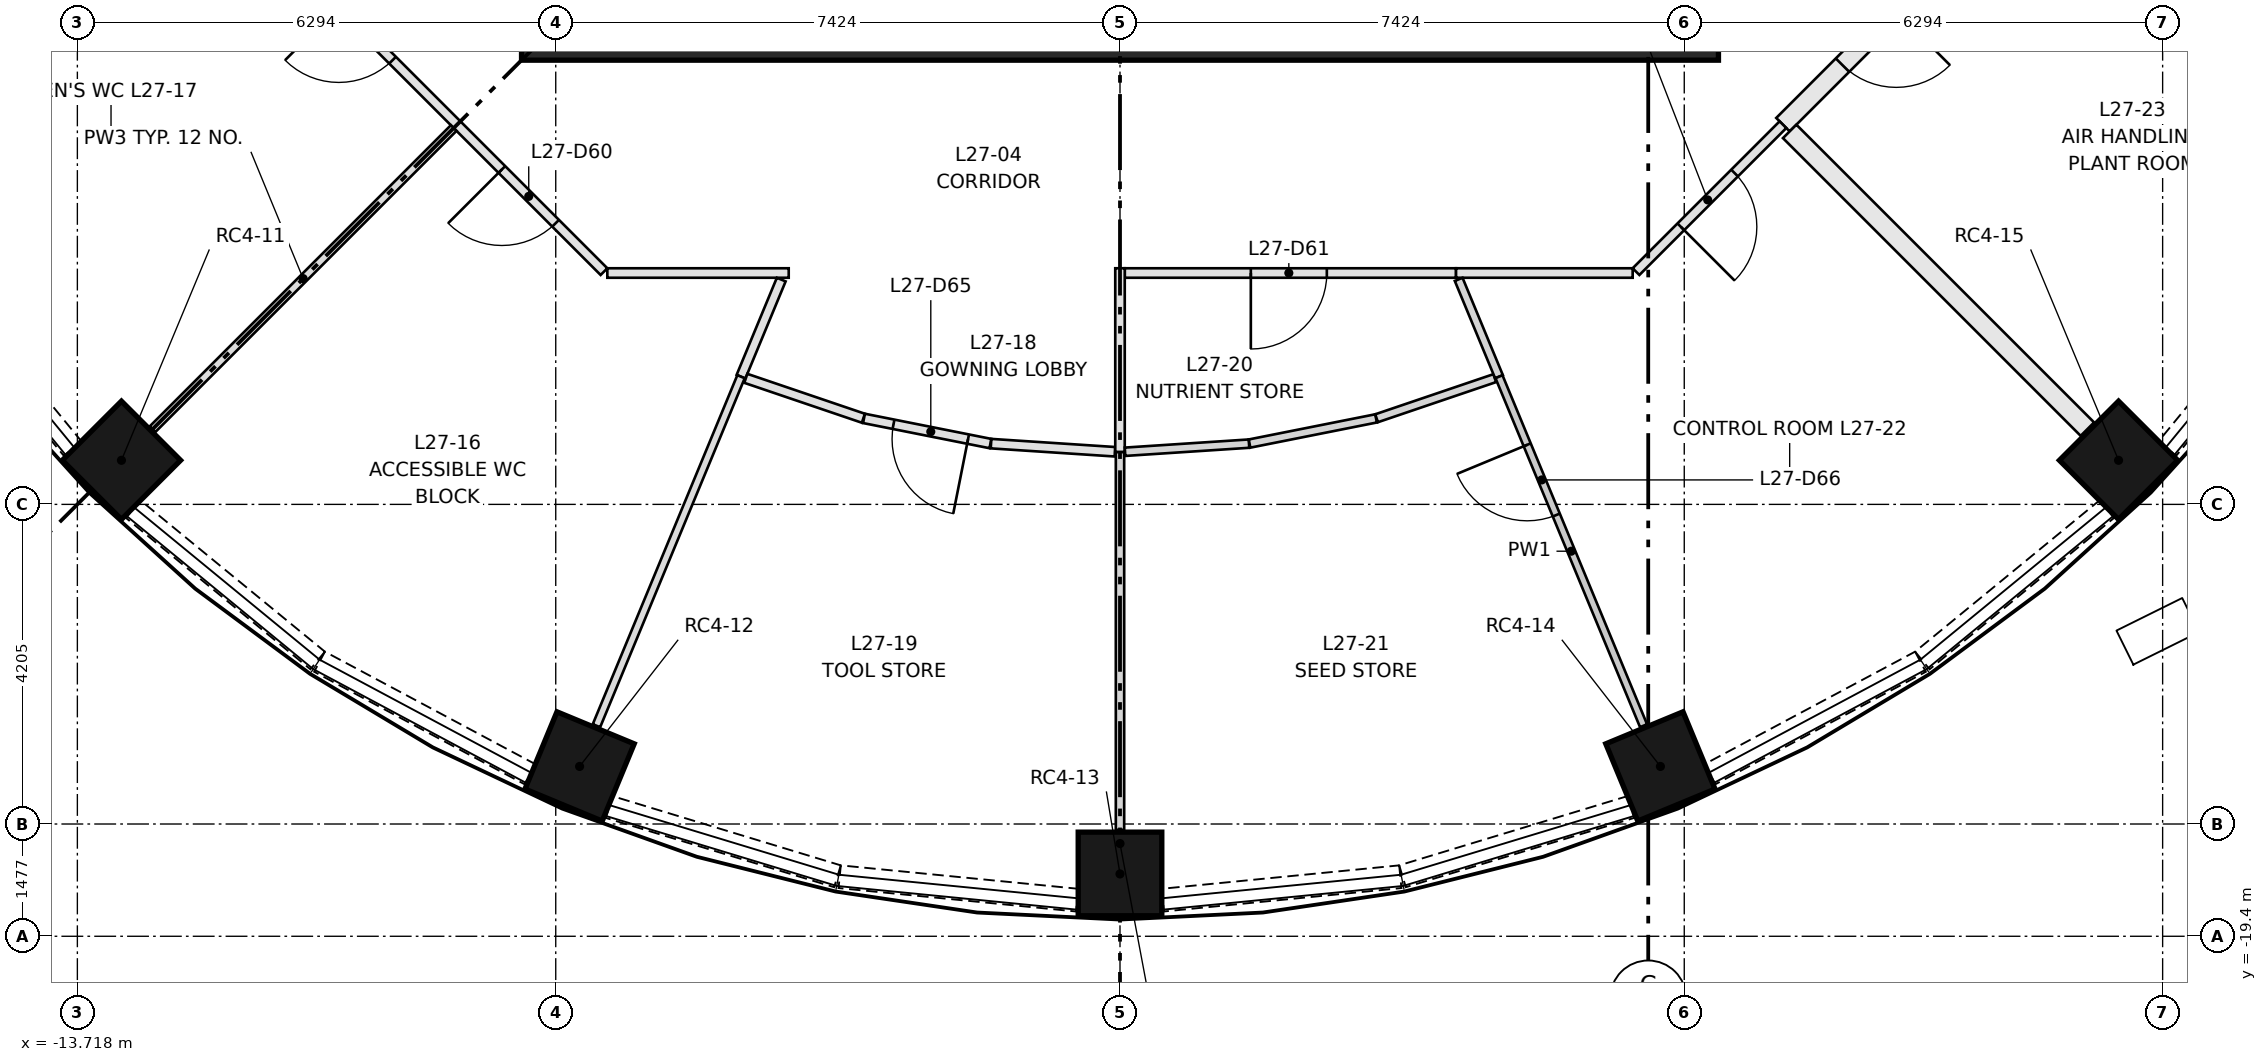
"""IFC4 building model, lengths in metres.
Left out: names, types, materials, properties, quantities, classifications, styles, units other than length and angle.
Written with IfcOpenShell. Run it as: python <this file> out.ifc"""

import sys

from ifc_helpers import new_model, si_unit, direction, frame, frame_2d, origin, origin_2d, place, context, subcontext, project, spatial, rectangle, extrude, element, fill, save


model = new_model("IFC4")
c1 = context("Model", 3, precision=1e-05, world=origin(), true_north=direction((0.0, 1.0)))
c2 = subcontext(c1, "Body", "Model", "MODEL_VIEW")
j1 = project(units=[si_unit("LENGTHUNIT", "METRE"), si_unit("PLANEANGLEUNIT", "RADIAN")], contexts=[c1])
p1 = place(None, origin())
s1 = spatial("IfcSite", under=j1, at=p1, CompositionType="ELEMENT")
p2 = place(p1, origin())
s2 = spatial("IfcBuilding", under=s1, at=p2, CompositionType="ELEMENT")
p3 = place(p2, frame((0.0, 0.0, 105.6)))
s3 = spatial("IfcBuildingStorey", under=s2, at=p3, CompositionType="ELEMENT", Elevation=105.6)
for number, where, z_axis, x_axis in (
    (1, (-13.138, -13.138, 0.0), (0.0, 0.0, 1.0), (-0.707, -0.707, 0.0)),
    (2, (-7.11, -17.166, 0.0), (0.0, 0.0, 1.0), (-0.383, -0.924, 0.0)),
    (3, (0.0, -18.58, 0.0), (0.0, 0.0, 1.0), (0.0, -1.0, 0.0)),
    (4, (7.11, -17.166, 0.0), (0.0, 0.0, 1.0), (0.383, -0.924, 0.0)),
    (5, (13.138, -13.138, 0.0), (0.0, 0.0, 1.0), (0.707, -0.707, 0.0)),
):
    element("IfcColumn", number, at=place(p3, frame(where, z_axis=z_axis, x_axis=x_axis)), inside=s3, PredefinedType="COLUMN", context=c2, shape_type="SweptSolid", body=[
        extrude(rectangle(XDim=1.1, YDim=1.1, at=origin_2d()), origin(), (0.0, 0.0, 1.0), 3.65),
    ])
p4 = place(p3, frame((-7.874, -7.499, 0.0), z_axis=(0.0, 0.0, 1.0), x_axis=(1.0, 0.0, 0.0)))
e6 = element("IfcWall", 6, at=p4, inside=s3, PredefinedType="SHEAR", context=c2, shape_type="SweptSolid", body=[
    extrude(rectangle(XDim=15.748, YDim=0.75, at=frame_2d((7.874, 0.0))), origin(), (0.0, 0.0, 1.0), 3.65),
])
for number, where, z_axis, x_axis in (
    (7, (-15.771, -10.557, 0.0), (0.0, 0.0, 1.0), (0.634, -0.773, 0.0)),
    (8, (-12.983, -13.781, 0.0), (0.0, 0.0, 1.0), (0.773, -0.634, 0.0)),
):
    element("IfcWall", number, at=place(p3, frame(where, z_axis=z_axis, x_axis=x_axis)), inside=s3, PredefinedType="SOLIDWALL", context=c2, shape_type="SweptSolid", body=[
        extrude(rectangle(XDim=3.139, YDim=0.3, at=frame_2d((1.569, 0.0))), origin(), (0.0, 0.0, 1.0), 0.9),
    ])
p5 = place(p3, frame((-10.532, -15.788, 0.0), z_axis=(0.0, 0.0, 1.0), x_axis=(0.88193278355, -0.471375185282, 0.0)))
e9 = element("IfcWall", 9, at=p5, inside=s3, PredefinedType="SOLIDWALL", context=c2, shape_type="SweptSolid", body=[
    extrude(rectangle(XDim=3.139, YDim=0.3, at=frame_2d((1.57, 0.0))), origin(), (0.0, 0.0, 1.0), 0.9),
])
p6 = place(p3, frame((-6.722, -17.699, 0.0), z_axis=(0.0, 0.0, 1.0), x_axis=(0.956961595403, -0.290214584271, 0.0)))
e10 = element("IfcWall", 10, at=p6, inside=s3, PredefinedType="SOLIDWALL", context=c2, shape_type="SweptSolid", body=[
    extrude(rectangle(XDim=3.139, YDim=0.3, at=frame_2d((1.57, 0.0))), origin(), (0.0, 0.0, 1.0), 0.9),
])
for number, where, z_axis, x_axis in (
    (11, (-3.688, -18.616, 0.0), (0.0, 0.0, 1.0), (0.995, -0.098, 0.0)),
    (12, (0.564, -18.925, 0.0), (0.0, 0.0, 1.0), (0.995, 0.098, 0.0)),
):
    element("IfcWall", number, at=place(p3, frame(where, z_axis=z_axis, x_axis=x_axis)), inside=s3, PredefinedType="SOLIDWALL", context=c2, shape_type="SweptSolid", body=[
        extrude(rectangle(XDim=3.139, YDim=0.3, at=frame_2d((1.57, 0.0))), origin(), (0.0, 0.0, 1.0), 0.9),
    ])
p7 = place(p3, frame((3.717, -18.611, 0.0), z_axis=(0.0, 0.0, 1.0), x_axis=(0.956961595403, 0.290214584271, 0.0)))
e13 = element("IfcWall", 13, at=p7, inside=s3, PredefinedType="SOLIDWALL", context=c2, shape_type="SweptSolid", body=[
    extrude(rectangle(XDim=3.139, YDim=0.3, at=frame_2d((1.57, 0.0))), origin(), (0.0, 0.0, 1.0), 0.9),
])
p8 = place(p3, frame((7.763, -17.268, 0.0), z_axis=(0.0, 0.0, 1.0), x_axis=(0.88193278355, 0.471375185282, 0.0)))
e14 = element("IfcWall", 14, at=p8, inside=s3, PredefinedType="SOLIDWALL", context=c2, shape_type="SweptSolid", body=[
    extrude(rectangle(XDim=3.139, YDim=0.3, at=frame_2d((1.57, 0.0))), origin(), (0.0, 0.0, 1.0), 0.9),
])
for number, where, z_axis, x_axis in (
    (15, (10.557, -15.771, 0.0), (0.0, 0.0, 1.0), (0.773, 0.634, 0.0)),
    (16, (13.781, -12.983, 0.0), (0.0, 0.0, 1.0), (0.634, 0.773, 0.0)),
):
    element("IfcWall", number, at=place(p3, frame(where, z_axis=z_axis, x_axis=x_axis)), inside=s3, PredefinedType="SOLIDWALL", context=c2, shape_type="SweptSolid", body=[
        extrude(rectangle(XDim=3.139, YDim=0.3, at=frame_2d((1.569, 0.0))), origin(), (0.0, 0.0, 1.0), 0.9),
    ])
p9 = place(p3, frame((10.637, -6.808, 0.0), z_axis=(0.0, 0.0, 1.0), x_axis=(-0.707151855722, -0.707061703777, 0.0)))
e17 = element("IfcWall", 17, at=p9, inside=s3, PredefinedType="PARTITIONING", context=c2, shape_type="SweptSolid", body=[
    extrude(rectangle(XDim=2.708, YDim=0.25, at=frame_2d((1.354, 0.0))), origin(), (0.0, 0.0, 1.0), 3.3),
])
p10 = place(p9, frame((0.6, 0.0, 0.0)))
e18 = element("IfcOpeningElement", 18, at=p10, cuts=e17, PredefinedType="OPENING", context=c2, shape_type="SweptSolid", body=[
    extrude(rectangle(XDim=1.0, YDim=2.1, at=frame_2d((0.5, 1.05))), frame((0.0, 0.135, 0.0), z_axis=(0.0, -1.0, 0.0), x_axis=(1.0, 0.0, 0.0)), (0.0, 0.0, 1.0), 0.27),
])
p11 = place(p3, frame((-8.722, -8.722, 0.0), z_axis=(0.0, 0.0, 1.0), x_axis=(-0.707151428813, 0.707062130741, 0.0)))
e19 = element("IfcWall", 19, at=p11, inside=s3, PredefinedType="PARTITIONING", context=c2, shape_type="SweptSolid", body=[
    extrude(rectangle(XDim=2.734, YDim=0.125, at=frame_2d((1.367, 0.0))), origin(), (0.0, 0.0, 1.0), 3.3),
])
p12 = place(p11, frame((1.2, 0.0, 0.0)))
e20 = element("IfcOpeningElement", 20, at=p12, cuts=e19, PredefinedType="OPENING", context=c2, shape_type="SweptSolid", body=[
    extrude(rectangle(XDim=1.0, YDim=2.1, at=frame_2d((0.5, 1.05))), frame((0.0, 0.073, 0.0), z_axis=(0.0, -1.0, 0.0), x_axis=(1.0, 0.0, 0.0)), (0.0, 0.0, 1.0), 0.145),
])
p13 = place(p3, frame((-6.789, -10.656, 0.0), z_axis=(0.0, 0.0, 1.0), x_axis=(-0.707062130741, 0.707151428813, 0.0)))
e21 = element("IfcWall", 21, at=p13, inside=s3, PredefinedType="PARTITIONING", context=c2, shape_type="SweptSolid", body=[
    extrude(rectangle(XDim=2.734, YDim=0.125, at=frame_2d((1.367, 0.0))), origin(), (0.0, 0.0, 1.0), 3.3),
])
p14 = place(p13, frame((0.9, 0.0, 0.0)))
e22 = element("IfcOpeningElement", 22, at=p14, cuts=e21, PredefinedType="OPENING", context=c2, shape_type="SweptSolid", body=[
    extrude(rectangle(XDim=1.0, YDim=2.1, at=frame_2d((0.5, 1.05))), frame((0.0, 0.073, 0.0), z_axis=(0.0, -1.0, 0.0), x_axis=(1.0, 0.0, 0.0)), (0.0, 0.0, 1.0), 0.145),
])
p15 = place(p3, frame((-4.359, -10.674, 0.0), z_axis=(0.0, 0.0, 1.0), x_axis=(-1.0, 0.0, 0.0)))
e23 = element("IfcWall", 23, at=p15, inside=s3, PredefinedType="PARTITIONING", context=c2, shape_type="SweptSolid", body=[
    extrude(rectangle(XDim=2.386, YDim=0.125, at=frame_2d((1.193, 0.0))), origin(), (0.0, 0.0, 1.0), 3.3),
])
p16 = place(p3, frame((4.421, -10.674, 0.0), z_axis=(0.0, 0.0, 1.0), x_axis=(-1.0, 0.0, 0.0)))
e24 = element("IfcWall", 24, at=p16, inside=s3, PredefinedType="PARTITIONING", context=c2, shape_type="SweptSolid", body=[
    extrude(rectangle(XDim=4.359, YDim=0.125, at=frame_2d((2.179, 0.0))), origin(), (0.0, 0.0, 1.0), 3.3),
])
p17 = place(p16, frame((1.7, 0.0, 0.0)))
e25 = element("IfcOpeningElement", 25, at=p17, cuts=e24, PredefinedType="OPENING", context=c2, shape_type="SweptSolid", body=[
    extrude(rectangle(XDim=1.0, YDim=2.1, at=frame_2d((0.5, 1.05))), frame((0.0, 0.073, 0.0), z_axis=(0.0, -1.0, 0.0), x_axis=(1.0, 0.0, 0.0)), (0.0, 0.0, 1.0), 0.145),
])
p18 = place(p3, frame((6.745, -10.674, 0.0), z_axis=(0.0, 0.0, 1.0), x_axis=(-1.0, 0.0, 0.0)))
e26 = element("IfcWall", 26, at=p18, inside=s3, PredefinedType="PARTITIONING", context=c2, shape_type="SweptSolid", body=[
    extrude(rectangle(XDim=2.324, YDim=0.125, at=frame_2d((1.162, 0.0))), origin(), (0.0, 0.0, 1.0), 3.3),
])
p19 = place(p3, frame((8.722, -8.722, 0.0), z_axis=(0.0, 0.0, 1.0), x_axis=(-0.707062130741, -0.707151428813, 0.0)))
e27 = element("IfcWall", 27, at=p19, inside=s3, PredefinedType="PARTITIONING", context=c2, shape_type="SweptSolid", body=[
    extrude(rectangle(XDim=2.734, YDim=0.125, at=frame_2d((1.367, 0.0))), origin(), (0.0, 0.0, 1.0), 3.3),
])
p20 = place(p19, frame((0.9, 0.0, 0.0)))
e28 = element("IfcOpeningElement", 28, at=p20, cuts=e27, PredefinedType="OPENING", context=c2, shape_type="SweptSolid", body=[
    extrude(rectangle(XDim=1.0, YDim=2.1, at=frame_2d((0.5, 1.05))), frame((0.0, 0.073, 0.0), z_axis=(0.0, -1.0, 0.0), x_axis=(1.0, 0.0, 0.0)), (0.0, 0.0, 1.0), 0.145),
])
p21 = place(p3, frame((-12.728, -12.728, 0.0), z_axis=(0.0, 0.0, 1.0), x_axis=(0.707106781187, 0.707106781187, 0.0)))
e29 = element("IfcWall", 29, at=p21, inside=s3, PredefinedType="PARTITIONING", context=c2, shape_type="SweptSolid", body=[
    extrude(rectangle(XDim=5.602, YDim=0.105, at=frame_2d((2.801, 0.0))), origin(), (0.0, 0.0, 1.0), 3.3),
])
p22 = place(p3, frame((-4.457, -10.76, 0.0), z_axis=(0.0, 0.0, 1.0), x_axis=(-0.382746785562, -0.923853288213, 0.0)))
e30 = element("IfcWall", 30, at=p22, inside=s3, PredefinedType="PARTITIONING", context=c2, shape_type="SweptSolid", body=[
    extrude(rectangle(XDim=1.383, YDim=0.125, at=frame_2d((0.691, 0.0))), origin(), (0.0, 0.0, 1.0), 3.3),
])
p23 = place(p3, frame((-4.986, -12.038, 0.0), z_axis=(0.0, 0.0, 1.0), x_axis=(-0.38266126553, -0.923888714003, 0.0)))
e31 = element("IfcWall", 31, at=p23, inside=s3, PredefinedType="PARTITIONING", context=c2, shape_type="SweptSolid", body=[
    extrude(rectangle(XDim=4.97, YDim=0.105, at=frame_2d((2.485, 0.0))), origin(), (0.0, 0.0, 1.0), 3.3),
])
p24 = place(p3, frame((-3.376, -12.585, 0.0), z_axis=(0.0, 0.0, 1.0), x_axis=(-0.946920220616, 0.321468654442, 0.0)))
e32 = element("IfcWall", 32, at=p24, inside=s3, PredefinedType="PARTITIONING", context=c2, shape_type="SweptSolid", body=[
    extrude(rectangle(XDim=1.634, YDim=0.125, at=frame_2d((0.817, 0.0))), origin(), (0.0, 0.0, 1.0), 3.3),
])
p25 = place(p3, frame((-1.705, -12.918, 0.0), z_axis=(0.0, 0.0, 1.0), x_axis=(-0.980795988991, 0.195036478586, 0.0)))
e33 = element("IfcWall", 33, at=p25, inside=s3, PredefinedType="PARTITIONING", context=c2, shape_type="SweptSolid", body=[
    extrude(rectangle(XDim=1.696, YDim=0.125, at=frame_2d((0.848, 0.0))), origin(), (0.0, 0.0, 1.0), 3.3),
])
p26 = place(p25, frame((0.3, 0.0, 0.0)))
e34 = element("IfcOpeningElement", 34, at=p26, cuts=e33, PredefinedType="OPENING", context=c2, shape_type="SweptSolid", body=[
    extrude(rectangle(XDim=1.0, YDim=2.1, at=frame_2d((0.5, 1.05))), frame((0.0, 0.073, 0.0), z_axis=(0.0, -1.0, 0.0), x_axis=(1.0, 0.0, 0.0)), (0.0, 0.0, 1.0), 0.145),
])
p27 = place(p3, frame((-0.067, -13.026, 0.0), z_axis=(0.0, 0.0, 1.0), x_axis=(-0.997855349109, 0.065457637099, 0.0)))
e35 = element("IfcWall", 35, at=p27, inside=s3, PredefinedType="PARTITIONING", context=c2, shape_type="SweptSolid", body=[
    extrude(rectangle(XDim=1.634, YDim=0.125, at=frame_2d((0.817, 0.0))), origin(), (0.0, 0.0, 1.0), 3.3),
])
p28 = place(p3, frame((0.0, -10.612, 0.0), z_axis=(0.0, 0.0, 1.0), x_axis=(0.0, -1.0, 0.0)))
e36 = element("IfcWall", 36, at=p28, inside=s3, PredefinedType="PARTITIONING", context=c2, shape_type="SweptSolid", body=[
    extrude(rectangle(XDim=2.418, YDim=0.125, at=frame_2d((1.209, 0.0))), origin(), (0.0, 0.0, 1.0), 3.3),
])
p29 = place(p3, frame((0.0, -13.03, 0.0), z_axis=(0.0, 0.0, 1.0), x_axis=(0.0, -1.0, 0.0)))
e37 = element("IfcWall", 37, at=p29, inside=s3, PredefinedType="PARTITIONING", context=c2, shape_type="SweptSolid", body=[
    extrude(rectangle(XDim=4.97, YDim=0.11, at=frame_2d((2.485, 0.0))), origin(), (0.0, 0.0, 1.0), 3.3),
])
p30 = place(p3, frame((1.697, -12.919, 0.0), z_axis=(0.0, 0.0, 1.0), x_axis=(-0.997857908157, -0.065418614545, 0.0)))
e38 = element("IfcWall", 38, at=p30, inside=s3, PredefinedType="PARTITIONING", context=c2, shape_type="SweptSolid", body=[
    extrude(rectangle(XDim=1.635, YDim=0.11, at=frame_2d((0.817, 0.0))), origin(), (0.0, 0.0, 1.0), 3.3),
])
p31 = place(p3, frame((3.369, -12.587, 0.0), z_axis=(0.0, 0.0, 1.0), x_axis=(-0.980790359024, -0.19506478833, 0.0)))
e39 = element("IfcWall", 39, at=p31, inside=s3, PredefinedType="PARTITIONING", context=c2, shape_type="SweptSolid", body=[
    extrude(rectangle(XDim=1.697, YDim=0.11, at=frame_2d((0.849, 0.0))), origin(), (0.0, 0.0, 1.0), 3.3),
])
p32 = place(p3, frame((4.931, -12.057, 0.0), z_axis=(0.0, 0.0, 1.0), x_axis=(-0.946990007889, -0.321263015235, 0.0)))
e40 = element("IfcWall", 40, at=p32, inside=s3, PredefinedType="PARTITIONING", context=c2, shape_type="SweptSolid", body=[
    extrude(rectangle(XDim=1.642, YDim=0.11, at=frame_2d((0.821, 0.0))), origin(), (0.0, 0.0, 1.0), 3.3),
])
p33 = place(p3, frame((4.456, -10.758, 0.0), z_axis=(0.0, 0.0, 1.0), x_axis=(0.382751066095, -0.923851514803, 0.0)))
e41 = element("IfcWall", 41, at=p33, inside=s3, PredefinedType="PARTITIONING", context=c2, shape_type="SweptSolid", body=[
    extrude(rectangle(XDim=1.386, YDim=0.11, at=frame_2d((0.693, 0.0))), origin(), (0.0, 0.0, 1.0), 3.3),
])
p34 = place(p3, frame((6.888, -16.63, 0.0), z_axis=(0.0, 0.0, 1.0), x_axis=(-0.38266126553, 0.923888714003, 0.0)))
e42 = element("IfcWall", 42, at=p34, inside=s3, PredefinedType="PARTITIONING", context=c2, shape_type="SweptSolid", body=[
    extrude(rectangle(XDim=4.97, YDim=0.1, at=frame_2d((2.485, 0.0))), origin(), (0.0, 0.0, 1.0), 3.3),
])
p35 = place(p34, frame((3.0, 0.0, 0.0)))
e43 = element("IfcOpeningElement", 43, at=p35, cuts=e42, PredefinedType="OPENING", context=c2, shape_type="SweptSolid", body=[
    extrude(rectangle(XDim=1.0, YDim=2.1, at=frame_2d((0.5, 1.05))), frame((0.0, 0.06, 0.0), z_axis=(0.0, -1.0, 0.0), x_axis=(1.0, 0.0, 0.0)), (0.0, 0.0, 1.0), 0.12),
])
p36 = place(p3, frame((8.811, -8.811, 0.0), z_axis=(0.0, 0.0, 1.0), x_axis=(0.707106781187, -0.707106781187, 0.0)))
e44 = element("IfcWall", 44, at=p36, inside=s3, PredefinedType="PARTITIONING", context=c2, shape_type="SweptSolid", body=[
    extrude(rectangle(XDim=5.54, YDim=0.25, at=frame_2d((2.77, 0.0))), origin(), (0.0, 0.0, 1.0), 3.3),
])
p37 = place(p10, origin())
e45 = element("IfcDoor", 45, at=p37, inside=s3, OperationType="SINGLE_SWING_LEFT", PredefinedType="DOOR", context=c2, shape_type="SweptSolid", body=[
    extrude(rectangle(XDim=1.0, YDim=2.1, at=frame_2d((0.5, 1.05))), frame((0.0, 0.025, 0.0), z_axis=(0.0, -1.0, 0.0), x_axis=(1.0, 0.0, 0.0)), (0.0, 0.0, 1.0), 0.05),
])
fill(e18, e45)
p38 = place(p12, origin())
e46 = element("IfcDoor", 46, at=p38, inside=s3, OperationType="SINGLE_SWING_RIGHT", PredefinedType="DOOR", context=c2, shape_type="SweptSolid", body=[
    extrude(rectangle(XDim=1.0, YDim=2.1, at=frame_2d((0.5, 1.05))), frame((0.0, 0.025, 0.0), z_axis=(0.0, -1.0, 0.0), x_axis=(1.0, 0.0, 0.0)), (0.0, 0.0, 1.0), 0.05),
])
fill(e20, e46)
p39 = place(p14, origin())
e47 = element("IfcDoor", 47, at=p39, inside=s3, OperationType="SINGLE_SWING_RIGHT", PredefinedType="DOOR", context=c2, shape_type="SweptSolid", body=[
    extrude(rectangle(XDim=1.0, YDim=2.1, at=frame_2d((0.5, 1.05))), frame((0.0, 0.025, 0.0), z_axis=(0.0, -1.0, 0.0), x_axis=(1.0, 0.0, 0.0)), (0.0, 0.0, 1.0), 0.05),
])
fill(e22, e47)
p40 = place(p17, origin())
e48 = element("IfcDoor", 48, at=p40, inside=s3, OperationType="SINGLE_SWING_RIGHT", PredefinedType="DOOR", context=c2, shape_type="SweptSolid", body=[
    extrude(rectangle(XDim=1.0, YDim=2.1, at=frame_2d((0.5, 1.05))), frame((0.0, 0.025, 0.0), z_axis=(0.0, -1.0, 0.0), x_axis=(1.0, 0.0, 0.0)), (0.0, 0.0, 1.0), 0.05),
])
fill(e25, e48)
p41 = place(p20, origin())
e49 = element("IfcDoor", 49, at=p41, inside=s3, OperationType="SINGLE_SWING_RIGHT", PredefinedType="DOOR", context=c2, shape_type="SweptSolid", body=[
    extrude(rectangle(XDim=1.0, YDim=2.1, at=frame_2d((0.5, 1.05))), frame((0.0, 0.025, 0.0), z_axis=(0.0, -1.0, 0.0), x_axis=(1.0, 0.0, 0.0)), (0.0, 0.0, 1.0), 0.05),
])
fill(e28, e49)
p42 = place(p26, origin())
e50 = element("IfcDoor", 50, at=p42, inside=s3, OperationType="SINGLE_SWING_LEFT", PredefinedType="DOOR", context=c2, shape_type="SweptSolid", body=[
    extrude(rectangle(XDim=1.0, YDim=2.1, at=frame_2d((0.5, 1.05))), frame((0.0, 0.025, 0.0), z_axis=(0.0, -1.0, 0.0), x_axis=(1.0, 0.0, 0.0)), (0.0, 0.0, 1.0), 0.05),
])
fill(e34, e50)
p43 = place(p35, origin())
e51 = element("IfcDoor", 51, at=p43, inside=s3, OperationType="SINGLE_SWING_RIGHT", PredefinedType="DOOR", context=c2, shape_type="SweptSolid", body=[
    extrude(rectangle(XDim=1.0, YDim=2.1, at=frame_2d((0.5, 1.05))), frame((0.0, 0.025, 0.0), z_axis=(0.0, -1.0, 0.0), x_axis=(1.0, 0.0, 0.0)), (0.0, 0.0, 1.0), 0.05),
])
fill(e43, e51)
save(model, sys.argv[1])
